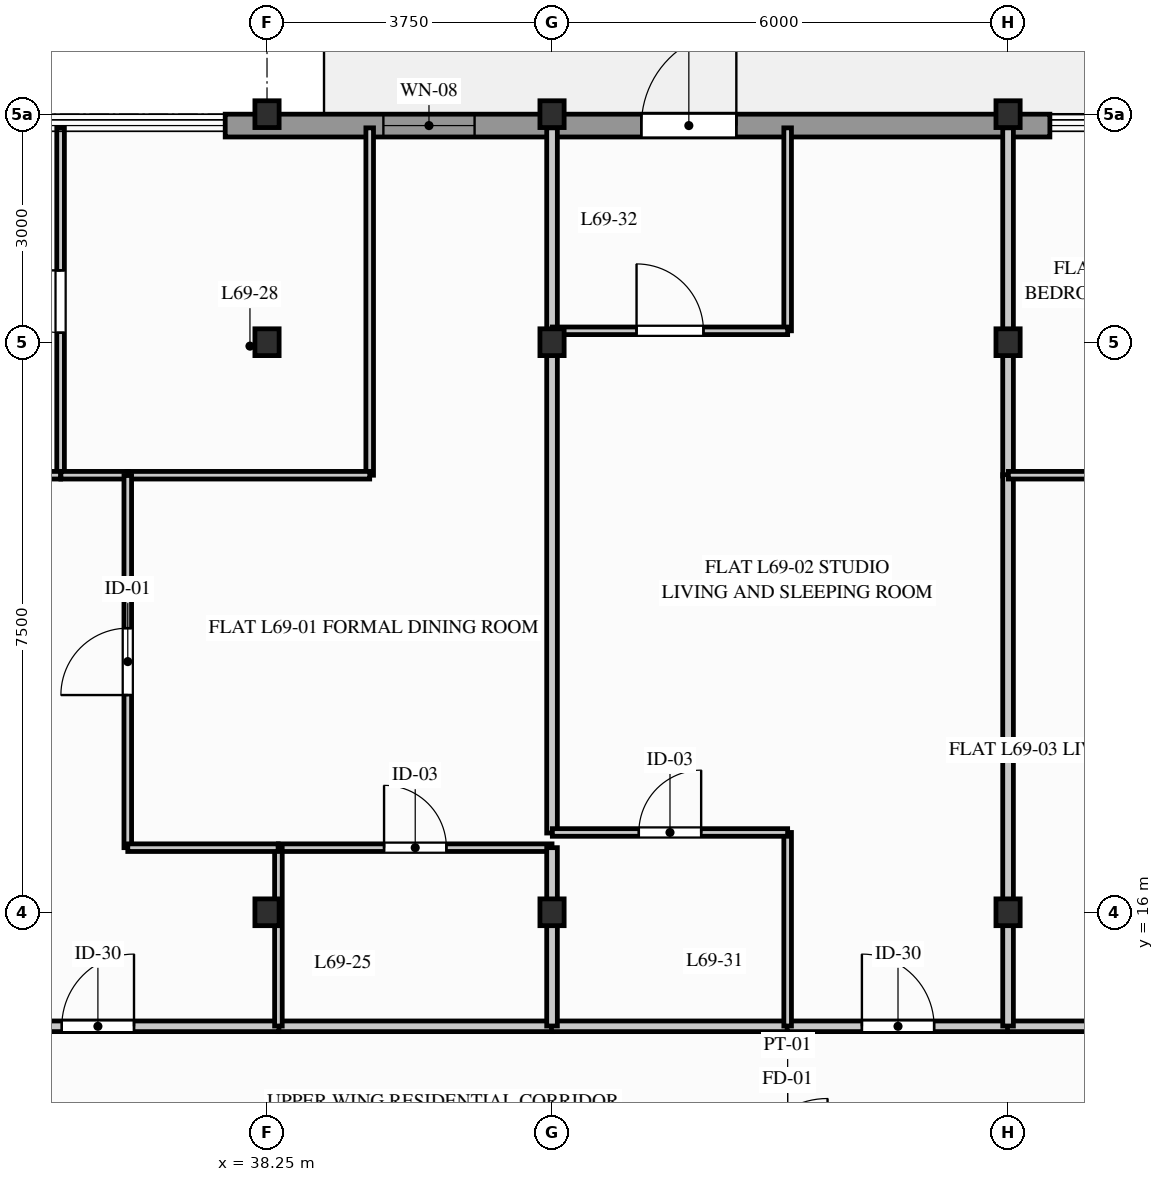
"""IFC4 building model, lengths in metres.
Left out: names, types, materials, properties, quantities, classifications, styles, units other than length and angle.
Written with IfcOpenShell. Run it as: python <this file> out.ifc"""

import sys

from ifc_helpers import new_model, si_unit, direction, frame, frame_2d, origin, origin_2d, place, context, subcontext, project, spatial, rectangle, i_section, extrude, element, fill, save


model = new_model("IFC4")
c1 = context("Model", 3, precision=1e-05, world=origin(), true_north=direction((0.0, 1.0)))
c2 = subcontext(c1, "Body", "Model", "MODEL_VIEW")
j1 = project(units=[si_unit("LENGTHUNIT", "METRE"), si_unit("PLANEANGLEUNIT", "RADIAN")], contexts=[c1])
p1 = place(None, origin())
s1 = spatial("IfcSite", under=j1, at=p1, CompositionType="ELEMENT")
p2 = place(p1, origin())
s2 = spatial("IfcBuilding", under=s1, at=p2, CompositionType="ELEMENT")
p3 = place(p2, frame((0.0, 0.0, 227.3)))
s3 = spatial("IfcBuildingStorey", under=s2, at=p3, CompositionType="ELEMENT", Elevation=227.3)
for number, where, z_axis, x_axis in (
    (1, (38.25, 16.0, 0.0), (0.0, 0.0, 1.0), (1.0, 0.0, 0.0)),
    (2, (38.25, 23.5, 0.0), (0.0, 0.0, 1.0), (1.0, 0.0, 0.0)),
    (3, (38.25, 26.5, 0.0), (0.0, 0.0, 1.0), (1.0, 0.0, 0.0)),
    (4, (42.0, 16.0, 0.0), (0.0, 0.0, 1.0), (1.0, 0.0, 0.0)),
    (5, (42.0, 23.5, 0.0), (0.0, 0.0, 1.0), (1.0, 0.0, 0.0)),
    (6, (42.0, 26.5, 0.0), (0.0, 0.0, 1.0), (1.0, 0.0, 0.0)),
    (7, (48.0, 16.0, 0.0), (0.0, 0.0, 1.0), (1.0, 0.0, 0.0)),
    (8, (48.0, 23.5, 0.0), (0.0, 0.0, 1.0), (1.0, 0.0, 0.0)),
    (9, (48.0, 26.5, 0.0), (0.0, 0.0, 1.0), (1.0, 0.0, 0.0)),
):
    element("IfcColumn", number, at=place(p3, frame(where, z_axis=z_axis, x_axis=x_axis)), inside=s3, PredefinedType="COLUMN", context=c2, shape_type="SweptSolid", body=[
        extrude(i_section(OverallWidth=0.318, OverallDepth=0.353, WebThickness=0.023, FlangeThickness=0.038, FilletRadius=0.015, at=origin_2d()), origin(), (0.0, 0.0, 1.0), 3.1),
    ])
p4 = place(p3, frame((37.7, 26.35, 0.0), z_axis=(0.0, 0.0, 1.0), x_axis=(1.0, 0.0, 0.0)))
e10 = element("IfcWall", 10, at=p4, inside=s3, PredefinedType="STANDARD", context=c2, shape_type="SweptSolid", body=[
    extrude(rectangle(XDim=10.85, YDim=0.3, at=frame_2d((5.425, 0.0))), origin(), (0.0, 0.0, 1.0), 2.332),
])
p5 = place(p4, frame((5.475, 0.0, 0.0)))
e11 = element("IfcOpeningElement", 11, at=p5, cuts=e10, PredefinedType="OPENING", context=c2, shape_type="SweptSolid", body=[
    extrude(rectangle(XDim=1.25, YDim=2.2, at=frame_2d((0.625, 1.1))), frame((0.0, 0.16, 0.0), z_axis=(0.0, -1.0, 0.0), x_axis=(1.0, 0.0, 0.0)), (0.0, 0.0, 1.0), 0.32),
])
p6 = place(p4, frame((2.081, 0.0, 0.512)))
e12 = element("IfcOpeningElement", 12, at=p6, cuts=e10, PredefinedType="OPENING", context=c2, shape_type="SweptSolid", body=[
    extrude(rectangle(XDim=1.2, YDim=1.6, at=frame_2d((0.6, 0.8))), frame((0.0, 0.16, 0.0), z_axis=(0.0, -1.0, 0.0), x_axis=(1.0, 0.0, 0.0)), (0.0, 0.0, 1.0), 0.32),
])
p7 = place(p3, frame((38.389, 14.5, 0.0), z_axis=(0.0, 0.0, 1.0), x_axis=(1.0, 0.0, 0.0)))
e13 = element("IfcWall", 13, at=p7, inside=s3, PredefinedType="PARTITIONING", context=c2, shape_type="SweptSolid", body=[
    extrude(rectangle(XDim=3.623, YDim=0.14, at=frame_2d((1.811, 0.0))), origin(), (0.0, 0.0, 1.0), 2.325),
])
p8 = place(p3, frame((33.643, 14.5, 0.0), z_axis=(0.0, 0.0, 1.0), x_axis=(1.0, 0.0, 0.0)))
e14 = element("IfcWall", 14, at=p8, inside=s3, PredefinedType="PARTITIONING", context=c2, shape_type="SweptSolid", body=[
    extrude(rectangle(XDim=4.765, YDim=0.14, at=frame_2d((2.382, 0.0))), origin(), (0.0, 0.0, 1.0), 2.325),
])
p9 = place(p8, frame((1.907, 0.0, 0.0)))
e15 = element("IfcOpeningElement", 15, at=p9, cuts=e14, PredefinedType="OPENING", context=c2, shape_type="SweptSolid", body=[
    extrude(rectangle(XDim=0.95, YDim=2.05, at=frame_2d((0.475, 1.025))), frame((0.0, 0.08, 0.0), z_axis=(0.0, -1.0, 0.0), x_axis=(1.0, 0.0, 0.0)), (0.0, 0.0, 1.0), 0.16),
])
p10 = place(p3, frame((41.993, 14.5, 0.0), z_axis=(0.0, 0.0, 1.0), x_axis=(1.0, 0.0, 0.0)))
e16 = element("IfcWall", 16, at=p10, inside=s3, PredefinedType="PARTITIONING", context=c2, shape_type="SweptSolid", body=[
    extrude(rectangle(XDim=3.119, YDim=0.14, at=frame_2d((1.559, 0.0))), origin(), (0.0, 0.0, 1.0), 2.325),
])
p11 = place(p3, frame((45.093, 14.5, 0.0), z_axis=(0.0, 0.0, 1.0), x_axis=(1.0, 0.0, 0.0)))
e17 = element("IfcWall", 17, at=p11, inside=s3, PredefinedType="PARTITIONING", context=c2, shape_type="SweptSolid", body=[
    extrude(rectangle(XDim=2.918, YDim=0.14, at=frame_2d((1.459, 0.0))), origin(), (0.0, 0.0, 1.0), 2.325),
])
p12 = place(p11, frame((0.984, 0.0, 0.0)))
e18 = element("IfcOpeningElement", 18, at=p12, cuts=e17, PredefinedType="OPENING", context=c2, shape_type="SweptSolid", body=[
    extrude(rectangle(XDim=0.95, YDim=2.05, at=frame_2d((0.475, 1.025))), frame((0.0, 0.08, 0.0), z_axis=(0.0, -1.0, 0.0), x_axis=(1.0, 0.0, 0.0)), (0.0, 0.0, 1.0), 0.16),
])
p13 = place(p3, frame((47.993, 14.5, 0.0), z_axis=(0.0, 0.0, 1.0), x_axis=(1.0, 0.0, 0.0)))
e19 = element("IfcWall", 19, at=p13, inside=s3, PredefinedType="PARTITIONING", context=c2, shape_type="SweptSolid", body=[
    extrude(rectangle(XDim=5.615, YDim=0.14, at=frame_2d((2.807, 0.0))), origin(), (0.0, 0.0, 1.0), 2.325),
])
p14 = place(p13, frame((2.332, 0.0, 0.0)))
e20 = element("IfcOpeningElement", 20, at=p14, cuts=e19, PredefinedType="OPENING", context=c2, shape_type="SweptSolid", body=[
    extrude(rectangle(XDim=0.95, YDim=2.05, at=frame_2d((0.475, 1.025))), frame((0.0, 0.08, 0.0), z_axis=(0.0, -1.0, 0.0), x_axis=(1.0, 0.0, 0.0)), (0.0, 0.0, 1.0), 0.16),
])
p15 = place(p3, frame((38.4, 16.85, 0.0), z_axis=(0.0, 0.0, 1.0), x_axis=(1.0, 0.0, 0.0)))
e21 = element("IfcWall", 21, at=p15, inside=s3, PredefinedType="PARTITIONING", context=c2, shape_type="SweptSolid", body=[
    extrude(rectangle(XDim=3.6, YDim=0.1, at=frame_2d((1.8, 0.0))), origin(), (0.0, 0.0, 1.0), 2.325),
])
p16 = place(p15, frame((1.39, 0.0, 0.0)))
e22 = element("IfcOpeningElement", 22, at=p16, cuts=e21, PredefinedType="OPENING", context=c2, shape_type="SweptSolid", body=[
    extrude(rectangle(XDim=0.82, YDim=2.02, at=frame_2d((0.41, 1.01))), frame((0.0, 0.06, 0.0), z_axis=(0.0, -1.0, 0.0), x_axis=(1.0, 0.0, 0.0)), (0.0, 0.0, 1.0), 0.12),
])
p17 = place(p3, frame((38.4, 14.504, 0.0), z_axis=(0.0, 0.0, 1.0), x_axis=(0.0, 1.0, 0.0)))
e23 = element("IfcWall", 23, at=p17, inside=s3, PredefinedType="PARTITIONING", context=c2, shape_type="SweptSolid", body=[
    extrude(rectangle(XDim=2.346, YDim=0.1, at=frame_2d((1.173, 0.0))), origin(), (0.0, 0.0, 1.0), 2.325),
])
p18 = place(p3, frame((42.0, 14.504, 0.0), z_axis=(0.0, 0.0, 1.0), x_axis=(0.0, 1.0, 0.0)))
e24 = element("IfcWall", 24, at=p18, inside=s3, PredefinedType="PARTITIONING", context=c2, shape_type="SweptSolid", body=[
    extrude(rectangle(XDim=2.346, YDim=0.14, at=frame_2d((1.173, 0.0))), origin(), (0.0, 0.0, 1.0), 2.325),
])
p19 = place(p3, frame((35.534, 21.75, 0.0), z_axis=(0.0, 0.0, 1.0), x_axis=(0.0, 1.0, 0.0)))
e25 = element("IfcWall", 25, at=p19, inside=s3, PredefinedType="PARTITIONING", context=c2, shape_type="SweptSolid", body=[
    extrude(rectangle(XDim=4.57, YDim=0.1, at=frame_2d((2.285, 0.0))), origin(), (0.0, 0.0, 1.0), 2.325),
])
p20 = place(p19, frame((1.875, 0.0, 0.0)))
e26 = element("IfcOpeningElement", 26, at=p20, cuts=e25, PredefinedType="OPENING", context=c2, shape_type="SweptSolid", body=[
    extrude(rectangle(XDim=0.82, YDim=2.02, at=frame_2d((0.41, 1.01))), frame((0.0, 0.06, 0.0), z_axis=(0.0, -1.0, 0.0), x_axis=(1.0, 0.0, 0.0)), (0.0, 0.0, 1.0), 0.12),
])
p21 = place(p3, frame((31.471, 21.75, 0.0), z_axis=(0.0, 0.0, 1.0), x_axis=(1.0, 0.0, 0.0)))
e27 = element("IfcWall", 27, at=p21, inside=s3, PredefinedType="PARTITIONING", context=c2, shape_type="SweptSolid", body=[
    extrude(rectangle(XDim=4.063, YDim=0.1, at=frame_2d((2.031, 0.0))), origin(), (0.0, 0.0, 1.0), 2.89),
])
p22 = place(p21, frame((1.592, 0.0, 0.0)))
e28 = element("IfcOpeningElement", 28, at=p22, cuts=e27, PredefinedType="OPENING", context=c2, shape_type="SweptSolid", body=[
    extrude(rectangle(XDim=0.88, YDim=2.04, at=frame_2d((0.44, 1.02))), frame((0.0, 0.06, 0.0), z_axis=(0.0, -1.0, 0.0), x_axis=(1.0, 0.0, 0.0)), (0.0, 0.0, 1.0), 0.12),
])
p23 = place(p3, frame((39.601, 21.75, 0.0), z_axis=(0.0, 0.0, 1.0), x_axis=(0.0, 1.0, 0.0)))
e29 = element("IfcWall", 29, at=p23, inside=s3, PredefinedType="PARTITIONING", context=c2, shape_type="SweptSolid", body=[
    extrude(rectangle(XDim=4.57, YDim=0.1, at=frame_2d((2.285, 0.0))), origin(), (0.0, 0.0, 1.0), 2.325),
])
p24 = place(p3, frame((36.407, 21.75, 0.0), z_axis=(0.0, 0.0, 1.0), x_axis=(1.0, 0.0, 0.0)))
e30 = element("IfcWall", 30, at=p24, inside=s3, PredefinedType="PARTITIONING", context=c2, shape_type="SweptSolid", body=[
    extrude(rectangle(XDim=3.194, YDim=0.1, at=frame_2d((1.597, 0.0))), origin(), (0.0, 0.0, 1.0), 2.325),
])
p25 = place(p3, frame((35.538, 21.75, 0.0), z_axis=(0.0, 0.0, 1.0), x_axis=(1.0, 0.0, 0.0)))
e31 = element("IfcWall", 31, at=p25, inside=s3, PredefinedType="PARTITIONING", context=c2, shape_type="SweptSolid", body=[
    extrude(rectangle(XDim=0.887, YDim=0.1, at=frame_2d((0.444, 0.0))), origin(), (0.0, 0.0, 1.0), 2.89),
])
p26 = place(p3, frame((36.418, 16.85, 0.0), z_axis=(0.0, 0.0, 1.0), x_axis=(0.0, 1.0, 0.0)))
e32 = element("IfcWall", 32, at=p26, inside=s3, PredefinedType="PARTITIONING", context=c2, shape_type="SweptSolid", body=[
    extrude(rectangle(XDim=4.896, YDim=0.1, at=frame_2d((2.448, 0.0))), origin(), (0.0, 0.0, 1.0), 2.614),
])
p27 = place(p26, frame((2.008, 0.0, 0.0)))
e33 = element("IfcOpeningElement", 33, at=p27, cuts=e32, PredefinedType="OPENING", context=c2, shape_type="SweptSolid", body=[
    extrude(rectangle(XDim=0.88, YDim=2.04, at=frame_2d((0.44, 1.02))), frame((0.0, 0.06, 0.0), z_axis=(0.0, -1.0, 0.0), x_axis=(1.0, 0.0, 0.0)), (0.0, 0.0, 1.0), 0.12),
])
p28 = place(p3, frame((36.418, 16.85, 0.0), z_axis=(0.0, 0.0, 1.0), x_axis=(1.0, 0.0, 0.0)))
e34 = element("IfcWall", 34, at=p28, inside=s3, PredefinedType="PARTITIONING", context=c2, shape_type="SweptSolid", body=[
    extrude(rectangle(XDim=1.978, YDim=0.1, at=frame_2d((0.989, 0.0))), origin(), (0.0, 0.0, 1.0), 2.325),
])
p29 = place(p3, frame((42.0, 23.639, 0.0), z_axis=(0.0, 0.0, 1.0), x_axis=(0.0, 1.0, 0.0)))
e35 = element("IfcWall", 35, at=p29, inside=s3, PredefinedType="PARTITIONING", context=c2, shape_type="SweptSolid", body=[
    extrude(rectangle(XDim=2.681, YDim=0.14, at=frame_2d((1.341, 0.0))), origin(), (0.0, 0.0, 1.0), 2.325),
])
p30 = place(p3, frame((42.0, 17.043, 0.0), z_axis=(0.0, 0.0, 1.0), x_axis=(0.0, 1.0, 0.0)))
e36 = element("IfcWall", 36, at=p30, inside=s3, PredefinedType="PARTITIONING", context=c2, shape_type="SweptSolid", body=[
    extrude(rectangle(XDim=6.615, YDim=0.14, at=frame_2d((3.307, 0.0))), origin(), (0.0, 0.0, 1.0), 2.325),
])
p31 = place(p3, frame((45.1, 14.504, 0.0), z_axis=(0.0, 0.0, 1.0), x_axis=(0.0, 1.0, 0.0)))
e37 = element("IfcWall", 37, at=p31, inside=s3, PredefinedType="PARTITIONING", context=c2, shape_type="SweptSolid", body=[
    extrude(rectangle(XDim=2.546, YDim=0.1, at=frame_2d((1.273, 0.0))), origin(), (0.0, 0.0, 1.0), 2.325),
])
p32 = place(p3, frame((42.004, 17.05, 0.0), z_axis=(0.0, 0.0, 1.0), x_axis=(1.0, 0.0, 0.0)))
e38 = element("IfcWall", 38, at=p32, inside=s3, PredefinedType="PARTITIONING", context=c2, shape_type="SweptSolid", body=[
    extrude(rectangle(XDim=3.096, YDim=0.1, at=frame_2d((1.548, 0.0))), origin(), (0.0, 0.0, 1.0), 2.325),
])
p33 = place(p32, frame((1.138, 0.0, 0.0)))
e39 = element("IfcOpeningElement", 39, at=p33, cuts=e38, PredefinedType="OPENING", context=c2, shape_type="SweptSolid", body=[
    extrude(rectangle(XDim=0.82, YDim=2.02, at=frame_2d((0.41, 1.01))), frame((0.0, 0.06, 0.0), z_axis=(0.0, -1.0, 0.0), x_axis=(1.0, 0.0, 0.0)), (0.0, 0.0, 1.0), 0.12),
])
p34 = place(p3, frame((45.1, 23.65, 0.0), z_axis=(0.0, 0.0, 1.0), x_axis=(0.0, 1.0, 0.0)))
e40 = element("IfcWall", 40, at=p34, inside=s3, PredefinedType="PARTITIONING", context=c2, shape_type="SweptSolid", body=[
    extrude(rectangle(XDim=2.67, YDim=0.1, at=frame_2d((1.335, 0.0))), origin(), (0.0, 0.0, 1.0), 2.89),
])
p35 = place(p3, frame((42.004, 23.65, 0.0), z_axis=(0.0, 0.0, 1.0), x_axis=(1.0, 0.0, 0.0)))
e41 = element("IfcWall", 41, at=p35, inside=s3, PredefinedType="PARTITIONING", context=c2, shape_type="SweptSolid", body=[
    extrude(rectangle(XDim=3.096, YDim=0.1, at=frame_2d((1.548, 0.0))), origin(), (0.0, 0.0, 1.0), 2.325),
])
p36 = place(p35, frame((1.108, 0.0, 0.0)))
e42 = element("IfcOpeningElement", 42, at=p36, cuts=e41, PredefinedType="OPENING", context=c2, shape_type="SweptSolid", body=[
    extrude(rectangle(XDim=0.88, YDim=2.04, at=frame_2d((0.44, 1.02))), frame((0.0, 0.06, 0.0), z_axis=(0.0, -1.0, 0.0), x_axis=(1.0, 0.0, 0.0)), (0.0, 0.0, 1.0), 0.12),
])
p37 = place(p3, frame((48.0, 21.739, 0.0), z_axis=(0.0, 0.0, 1.0), x_axis=(0.0, 1.0, 0.0)))
e43 = element("IfcWall", 43, at=p37, inside=s3, PredefinedType="PARTITIONING", context=c2, shape_type="SweptSolid", body=[
    extrude(rectangle(XDim=4.581, YDim=0.14, at=frame_2d((2.291, 0.0))), origin(), (0.0, 0.0, 1.0), 2.325),
])
p38 = place(p3, frame((48.0, 14.504, 0.0), z_axis=(0.0, 0.0, 1.0), x_axis=(0.0, 1.0, 0.0)))
e44 = element("IfcWall", 44, at=p38, inside=s3, PredefinedType="PARTITIONING", context=c2, shape_type="SweptSolid", body=[
    extrude(rectangle(XDim=7.253, YDim=0.14, at=frame_2d((3.627, 0.0))), origin(), (0.0, 0.0, 1.0), 2.325),
])
p39 = place(p3, frame((48.004, 21.75, 0.0), z_axis=(0.0, 0.0, 1.0), x_axis=(1.0, 0.0, 0.0)))
e45 = element("IfcWall", 45, at=p39, inside=s3, PredefinedType="PARTITIONING", context=c2, shape_type="SweptSolid", body=[
    extrude(rectangle(XDim=6.946, YDim=0.1, at=frame_2d((3.473, 0.0))), origin(), (0.0, 0.0, 1.0), 2.325),
])
p40 = place(p39, frame((3.033, 0.0, 0.0)))
e46 = element("IfcOpeningElement", 46, at=p40, cuts=e45, PredefinedType="OPENING", context=c2, shape_type="SweptSolid", body=[
    extrude(rectangle(XDim=0.88, YDim=2.04, at=frame_2d((0.44, 1.02))), frame((0.0, 0.06, 0.0), z_axis=(0.0, -1.0, 0.0), x_axis=(1.0, 0.0, 0.0)), (0.0, 0.0, 1.0), 0.12),
])
p41 = place(p5, origin())
e47 = element("IfcDoor", 47, at=p41, inside=s3, OperationType="SINGLE_SWING_RIGHT", PredefinedType="DOOR", context=c2, shape_type="SweptSolid", body=[
    extrude(rectangle(XDim=1.25, YDim=2.2, at=frame_2d((0.625, 1.1))), frame((0.0, 0.025, 0.0), z_axis=(0.0, -1.0, 0.0), x_axis=(1.0, 0.0, 0.0)), (0.0, 0.0, 1.0), 0.05),
])
fill(e11, e47)
p42 = place(p6, origin())
e48 = element("IfcWindow", 48, at=p42, inside=s3, PartitioningType="SINGLE_PANEL", PredefinedType="WINDOW", context=c2, shape_type="SweptSolid", body=[
    extrude(rectangle(XDim=1.2, YDim=1.6, at=frame_2d((0.6, 0.8))), frame((0.0, 0.03, 0.0), z_axis=(0.0, -1.0, 0.0), x_axis=(1.0, 0.0, 0.0)), (0.0, 0.0, 1.0), 0.06),
])
fill(e12, e48)
p43 = place(p9, origin())
e49 = element("IfcDoor", 49, at=p43, inside=s3, OperationType="SINGLE_SWING_RIGHT", PredefinedType="DOOR", context=c2, shape_type="SweptSolid", body=[
    extrude(rectangle(XDim=0.95, YDim=2.05, at=frame_2d((0.475, 1.025))), frame((0.0, 0.025, 0.0), z_axis=(0.0, -1.0, 0.0), x_axis=(1.0, 0.0, 0.0)), (0.0, 0.0, 1.0), 0.05),
])
fill(e15, e49)
p44 = place(p12, origin())
e50 = element("IfcDoor", 50, at=p44, inside=s3, OperationType="SINGLE_SWING_LEFT", PredefinedType="DOOR", context=c2, shape_type="SweptSolid", body=[
    extrude(rectangle(XDim=0.95, YDim=2.05, at=frame_2d((0.475, 1.025))), frame((0.0, 0.025, 0.0), z_axis=(0.0, -1.0, 0.0), x_axis=(1.0, 0.0, 0.0)), (0.0, 0.0, 1.0), 0.05),
])
fill(e18, e50)
p45 = place(p27, origin())
e51 = element("IfcDoor", 51, at=p45, inside=s3, OperationType="SINGLE_SWING_LEFT", PredefinedType="DOOR", context=c2, shape_type="SweptSolid", body=[
    extrude(rectangle(XDim=0.88, YDim=2.04, at=frame_2d((0.44, 1.02))), frame((0.0, 0.025, 0.0), z_axis=(0.0, -1.0, 0.0), x_axis=(1.0, 0.0, 0.0)), (0.0, 0.0, 1.0), 0.05),
])
fill(e33, e51)
p46 = place(p33, origin())
e52 = element("IfcDoor", 52, at=p46, inside=s3, OperationType="SINGLE_SWING_RIGHT", PredefinedType="DOOR", context=c2, shape_type="SweptSolid", body=[
    extrude(rectangle(XDim=0.82, YDim=2.02, at=frame_2d((0.41, 1.01))), frame((0.0, 0.025, 0.0), z_axis=(0.0, -1.0, 0.0), x_axis=(1.0, 0.0, 0.0)), (0.0, 0.0, 1.0), 0.05),
])
fill(e39, e52)
p47 = place(p36, origin())
e53 = element("IfcDoor", 53, at=p47, inside=s3, OperationType="SINGLE_SWING_LEFT", PredefinedType="DOOR", context=c2, shape_type="SweptSolid", body=[
    extrude(rectangle(XDim=0.88, YDim=2.04, at=frame_2d((0.44, 1.02))), frame((0.0, 0.025, 0.0), z_axis=(0.0, -1.0, 0.0), x_axis=(1.0, 0.0, 0.0)), (0.0, 0.0, 1.0), 0.05),
])
fill(e42, e53)
p48 = place(p16, origin())
e54 = element("IfcDoor", 54, at=p48, inside=s3, OperationType="SINGLE_SWING_LEFT", PredefinedType="DOOR", context=c2, shape_type="SweptSolid", body=[
    extrude(rectangle(XDim=0.82, YDim=2.02, at=frame_2d((0.41, 1.01))), frame((0.0, 0.025, 0.0), z_axis=(0.0, -1.0, 0.0), x_axis=(1.0, 0.0, 0.0)), (0.0, 0.0, 1.0), 0.05),
])
fill(e22, e54)
p49 = place(p20, origin())
e55 = element("IfcDoor", 55, at=p49, inside=s3, OperationType="SINGLE_SWING_RIGHT", PredefinedType="DOOR", context=c2, shape_type="SweptSolid", body=[
    extrude(rectangle(XDim=0.82, YDim=2.02, at=frame_2d((0.41, 1.01))), frame((0.0, 0.025, 0.0), z_axis=(0.0, -1.0, 0.0), x_axis=(1.0, 0.0, 0.0)), (0.0, 0.0, 1.0), 0.05),
])
fill(e26, e55)
save(model, sys.argv[1])
